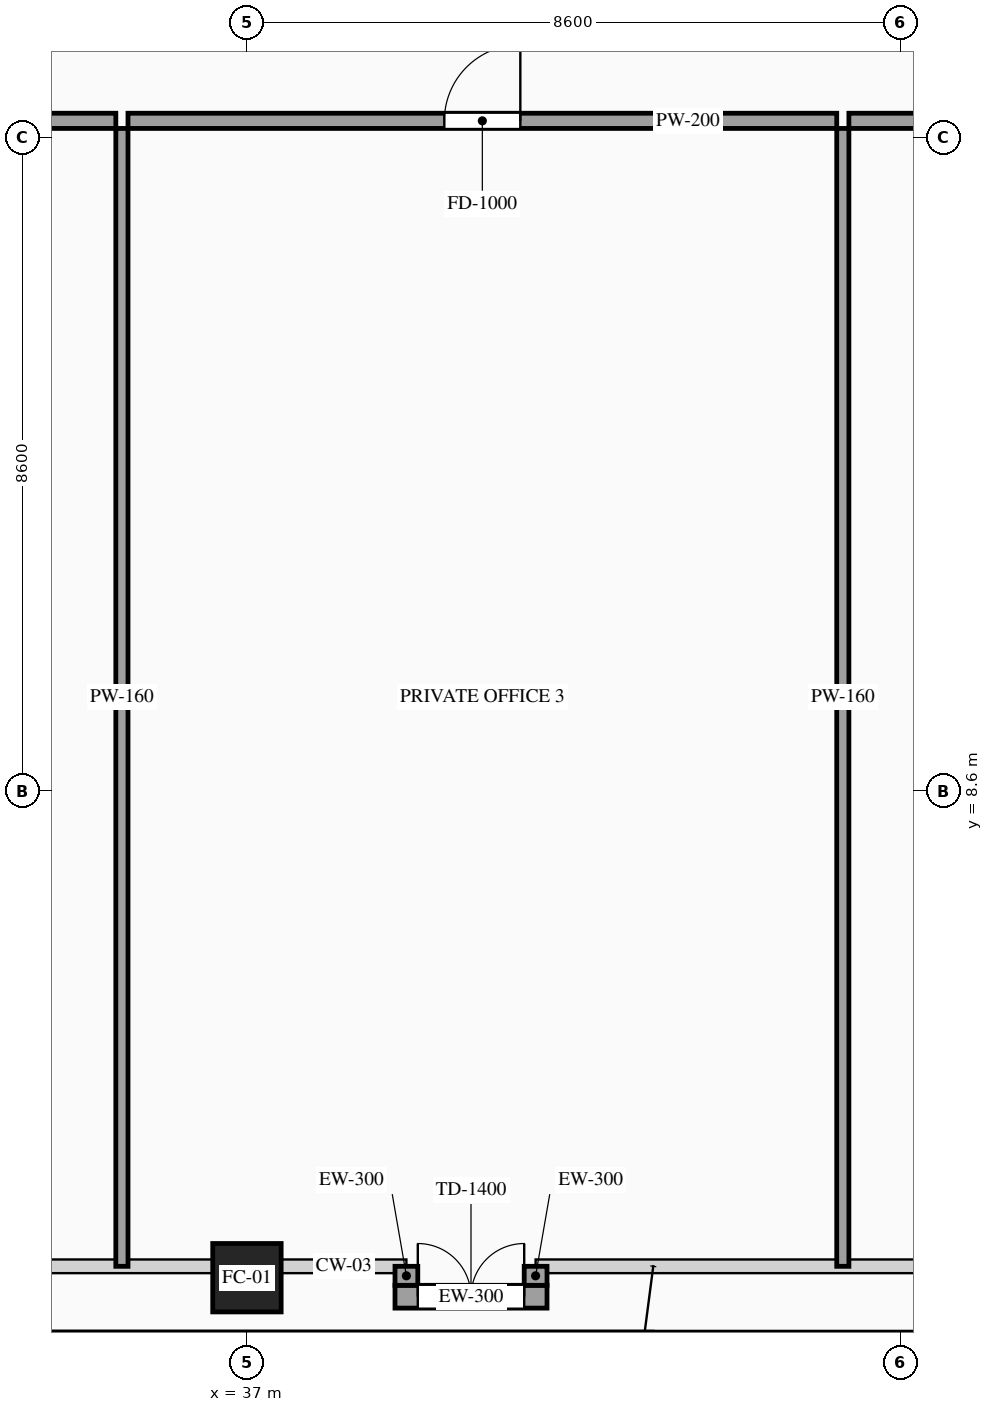
"""IFC4 building model, lengths in metres.
Left out: names, types, materials, properties, quantities, classifications, styles, units other than length and angle.
Written with IfcOpenShell. Run it as: python <this file> out.ifc"""

import sys

from ifc_helpers import new_model, si_unit, direction, frame, frame_2d, origin, origin_2d, place, context, subcontext, project, spatial, rectangle, hollow_rectangle, extrude, source, transform, mapped, element, fill, save


model = new_model("IFC4")
c1 = context("Model", 3, precision=1e-05, world=origin(), true_north=direction((0.0, 1.0)))
c2 = subcontext(c1, "Body", "Model", "MODEL_VIEW")
j1 = project(units=[si_unit("LENGTHUNIT", "METRE"), si_unit("PLANEANGLEUNIT", "RADIAN")], contexts=[c1])
p1 = place(None, origin())
s1 = spatial("IfcSite", under=j1, at=p1, CompositionType="ELEMENT")
p2 = place(p1, origin())
s2 = spatial("IfcBuilding", under=s1, at=p2, CompositionType="ELEMENT")
p3 = place(p2, frame((0.0, 0.0, 152.4)))
s3 = spatial("IfcBuildingStorey", under=s2, at=p3, CompositionType="ELEMENT", Elevation=152.4)
m1 = source(origin(), c2, "Body", "SweptSolid", [
    extrude(hollow_rectangle(XDim=0.9, YDim=0.9, WallThickness=0.042, at=origin_2d()), origin(), (0.0, 0.0, 1.0), 3.6),
])
p4 = place(p3, frame((37.0, 2.2, 0.0), z_axis=(0.0, 0.0, 1.0), x_axis=(1.0, 0.0, 0.0)))
e1 = element("IfcColumn", 1, at=p4, inside=s3, PredefinedType="COLUMN", context=c2, shape_type="MappedRepresentation", body=[
    mapped(m1, transform((0.0, 0.0, 0.0), scale=1.0)),
])
p5 = place(p3, frame((38.948, 1.95, 0.0), z_axis=(0.0, 0.0, 1.0), x_axis=(1.0, 0.0, 0.0)))
e2 = element("IfcWall", 2, at=p5, inside=s3, PredefinedType="SOLIDWALL", context=c2, shape_type="SweptSolid", body=[
    extrude(rectangle(XDim=2.0, YDim=0.3, at=frame_2d((1.0, 0.0))), origin(), (0.0, 0.0, 1.0), 3.38),
])
p6 = place(p5, frame((0.3, 0.0, 0.0)))
e3 = element("IfcOpeningElement", 3, at=p6, cuts=e2, PredefinedType="OPENING", context=c2, shape_type="SweptSolid", body=[
    extrude(rectangle(XDim=1.4, YDim=2.3, at=frame_2d((0.7, 1.15))), frame((0.0, 0.165, 0.0), z_axis=(0.0, -1.0, 0.0), x_axis=(1.0, 0.0, 0.0)), (0.0, 0.0, 1.0), 0.33),
])
m2 = source(origin(), c2, "Body", "SweptSolid", [
    extrude(rectangle(XDim=0.25, YDim=0.3, at=frame_2d((0.125, 0.0))), origin(), (0.0, 0.0, 1.0), 3.38),
])
for number, where, z_axis, x_axis in (
    (4, (39.098, 2.35, 0.0), (0.0, 0.0, 1.0), (0.0, -1.0, 0.0)),
    (5, (40.798, 2.1, 0.0), (0.0, 0.0, 1.0), (0.0, 1.0, 0.0)),
):
    element("IfcWall", number, at=place(p3, frame(where, z_axis=z_axis, x_axis=x_axis)), inside=s3, PredefinedType="SOLIDWALL", context=c2, shape_type="MappedRepresentation", body=[
        mapped(m2, transform((0.0, 0.0, 0.0), scale=1.0)),
    ])
p7 = place(p3, frame((31.214, 17.42, 0.0), z_axis=(0.0, 0.0, 1.0), x_axis=(1.0, 0.0, 0.0)))
e6 = element("IfcWall", 6, at=p7, inside=s3, PredefinedType="PARTITIONING", context=c2, shape_type="SweptSolid", body=[
    extrude(rectangle(XDim=4.061, YDim=0.2, at=frame_2d((2.03, 0.0))), origin(), (0.0, 0.0, 1.0), 3.38),
])
p8 = place(p7, frame((1.531, 0.0, 0.0)))
e7 = element("IfcOpeningElement", 7, at=p8, cuts=e6, PredefinedType="OPENING", context=c2, shape_type="SweptSolid", body=[
    extrude(rectangle(XDim=1.0, YDim=2.2, at=frame_2d((0.5, 1.1))), frame((0.0, 0.115, 0.0), z_axis=(0.0, -1.0, 0.0), x_axis=(1.0, 0.0, 0.0)), (0.0, 0.0, 1.0), 0.23),
])
m3 = source(origin(), c2, "Body", "SweptSolid", [
    extrude(rectangle(XDim=14.97, YDim=0.16, at=frame_2d((7.485, 0.0))), origin(), (0.0, 0.0, 1.0), 3.38),
])
p9 = place(p3, frame((35.355, 2.35, 0.0), z_axis=(0.0, 0.0, 1.0), x_axis=(0.0, 1.0, 0.0)))
e8 = element("IfcWall", 8, at=p9, inside=s3, PredefinedType="PARTITIONING", context=c2, shape_type="MappedRepresentation", body=[
    mapped(m3, transform((0.0, 0.0, 0.0), scale=1.0)),
])
p10 = place(p3, frame((35.435, 17.42, 0.0), z_axis=(0.0, 0.0, 1.0), x_axis=(1.0, 0.0, 0.0)))
e9 = element("IfcWall", 9, at=p10, inside=s3, PredefinedType="PARTITIONING", context=c2, shape_type="SweptSolid", body=[
    extrude(rectangle(XDim=9.325, YDim=0.2, at=frame_2d((4.663, 0.0))), origin(), (0.0, 0.0, 1.0), 3.38),
])
p11 = place(p10, frame((4.162, 0.0, 0.0)))
e10 = element("IfcOpeningElement", 10, at=p11, cuts=e9, PredefinedType="OPENING", context=c2, shape_type="SweptSolid", body=[
    extrude(rectangle(XDim=1.0, YDim=2.2, at=frame_2d((0.5, 1.1))), frame((0.0, 0.115, 0.0), z_axis=(0.0, -1.0, 0.0), x_axis=(1.0, 0.0, 0.0)), (0.0, 0.0, 1.0), 0.23),
])
p12 = place(p3, frame((44.84, 2.35, 0.0), z_axis=(0.0, 0.0, 1.0), x_axis=(0.0, 1.0, 0.0)))
e11 = element("IfcWall", 11, at=p12, inside=s3, PredefinedType="PARTITIONING", context=c2, shape_type="MappedRepresentation", body=[
    mapped(m3, transform((0.0, 0.0, 0.0), scale=1.0)),
])
p13 = place(p3, frame((44.92, 17.42, 0.0), z_axis=(0.0, 0.0, 1.0), x_axis=(1.0, 0.0, 0.0)))
e12 = element("IfcWall", 12, at=p13, inside=s3, PredefinedType="PARTITIONING", context=c2, shape_type="SweptSolid", body=[
    extrude(rectangle(XDim=4.062, YDim=0.2, at=frame_2d((2.031, 0.0))), origin(), (0.0, 0.0, 1.0), 3.38),
])
p14 = place(p13, frame((1.531, 0.0, 0.0)))
e13 = element("IfcOpeningElement", 13, at=p14, cuts=e12, PredefinedType="OPENING", context=c2, shape_type="SweptSolid", body=[
    extrude(rectangle(XDim=1.0, YDim=2.2, at=frame_2d((0.5, 1.1))), frame((0.0, 0.115, 0.0), z_axis=(0.0, -1.0, 0.0), x_axis=(1.0, 0.0, 0.0)), (0.0, 0.0, 1.0), 0.23),
])
m4 = source(origin(), c2, "Body", "SweptSolid", [
    extrude(rectangle(XDim=1.4, YDim=2.3, at=frame_2d((0.7, 1.15))), frame((0.0, 0.025, 0.0), z_axis=(0.0, -1.0, 0.0), x_axis=(1.0, 0.0, 0.0)), (0.0, 0.0, 1.0), 0.05),
])
p15 = place(p6, origin())
e14 = element("IfcDoor", 14, at=p15, inside=s3, OperationType="DOUBLE_DOOR_SINGLE_SWING", PredefinedType="DOOR", context=c2, shape_type="MappedRepresentation", body=[
    mapped(m4, transform((0.0, 0.0, 0.0), scale=1.0)),
])
fill(e3, e14)
m5 = source(origin(), c2, "Body", "SweptSolid", [
    extrude(rectangle(XDim=1.0, YDim=2.2, at=frame_2d((0.5, 1.1))), frame((0.0, 0.025, 0.0), z_axis=(0.0, -1.0, 0.0), x_axis=(1.0, 0.0, 0.0)), (0.0, 0.0, 1.0), 0.05),
])
p16 = place(p11, origin())
e15 = element("IfcDoor", 15, at=p16, inside=s3, OperationType="SINGLE_SWING_RIGHT", PredefinedType="DOOR", context=c2, shape_type="MappedRepresentation", body=[
    mapped(m5, transform((0.0, 0.0, 0.0), scale=1.0)),
])
fill(e10, e15)
save(model, sys.argv[1])
